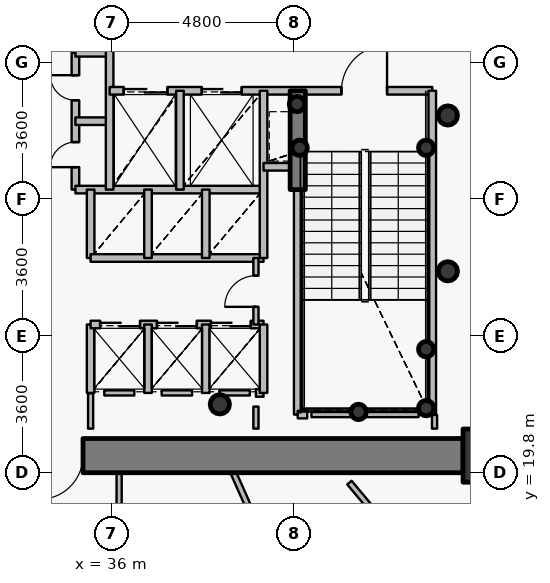
"""IFC4 building model, lengths in metres.
Left out: names, types, materials, properties, quantities, classifications, styles, units other than length and angle.
Written with IfcOpenShell. Run it as: python <this file> out.ifc"""

import sys

from ifc_helpers import new_model, si_unit, direction, frame, frame_2d, origin, origin_2d, place, context, subcontext, project, spatial, rectangle, hollow_circle, extrude, source, transform, mapped, element, fill, save


model = new_model("IFC4")
c1 = context("Model", 3, precision=1e-05, world=origin(), true_north=direction((0.0, 1.0)))
c2 = subcontext(c1, "Body", "Model", "MODEL_VIEW")
j1 = project(units=[si_unit("LENGTHUNIT", "METRE"), si_unit("PLANEANGLEUNIT", "RADIAN")], contexts=[c1])
p1 = place(None, origin())
s1 = spatial("IfcSite", under=j1, at=p1, CompositionType="ELEMENT")
p2 = place(p1, origin())
s2 = spatial("IfcBuilding", under=s1, at=p2, CompositionType="ELEMENT")
p3 = place(p2, frame((0.0, 0.0, 36.6)))
s3 = spatial("IfcBuildingStorey", under=s2, at=p3, CompositionType="ELEMENT", Elevation=36.6)
p4 = place(p3, frame((45.95, 20.25, 0.0), z_axis=(0.0, 0.0, 1.0), x_axis=(1.0, 0.0, 0.0)))
e1 = element("IfcColumn", 1, at=p4, inside=s3, PredefinedType="COLUMN", context=c2, shape_type="SweptSolid", body=[
    extrude(rectangle(XDim=1.4, YDim=1.4, at=origin_2d()), origin(), (0.0, 0.0, 1.0), 4.2),
])
p5 = place(p3, frame((38.85, 21.6, 0.0), z_axis=(0.0, 0.0, 1.0), x_axis=(1.0, 0.0, 0.0)))
e2 = element("IfcColumn", 2, at=p5, inside=s3, PredefinedType="COLUMN", context=c2, shape_type="SweptSolid", body=[
    extrude(hollow_circle(Radius=0.254, WallThickness=0.02, at=origin_2d()), origin(), (0.0, 0.0, 1.0), 4.2),
])
for number, where, z_axis, x_axis in (
    (3, (44.28, 21.5, 0.0), (0.0, 0.0, 1.0), (1.0, 0.0, 0.0)),
    (4, (44.28, 23.05, 0.0), (0.0, 0.0, 1.0), (1.0, 0.0, 0.0)),
    (5, (42.5, 21.4, 0.0), (0.0, 0.0, 1.0), (1.0, 0.0, 0.0)),
    (6, (40.95, 28.35, 0.0), (0.0, 0.0, 1.0), (1.0, 0.0, 0.0)),
    (7, (44.28, 28.35, 0.0), (0.0, 0.0, 1.0), (1.0, 0.0, 0.0)),
    (8, (40.88, 29.5, 0.0), (0.0, 0.0, 1.0), (1.0, 0.0, 0.0)),
):
    element("IfcColumn", number, at=place(p3, frame(where, z_axis=z_axis, x_axis=x_axis)), inside=s3, PredefinedType="COLUMN", context=c2, shape_type="SweptSolid", body=[
        extrude(hollow_circle(Radius=0.203, WallThickness=0.016, at=origin_2d()), origin(), (0.0, 0.0, 1.0), 4.2),
    ])
p6 = place(p3, frame((45.25, 20.25, 0.0), z_axis=(0.0, 0.0, 1.0), x_axis=(-1.0, 0.0, 0.0)))
e9 = element("IfcWall", 9, at=p6, inside=s3, PredefinedType="SHEAR", context=c2, shape_type="SweptSolid", body=[
    extrude(rectangle(XDim=18.5, YDim=0.9, at=frame_2d((9.25, 0.0))), origin(), (0.0, 0.0, 1.0), 3.4),
])
p7 = place(p6, frame((10.0, 0.0, 0.0)))
e10 = element("IfcOpeningElement", 10, at=p7, cuts=e9, PredefinedType="OPENING", context=c2, shape_type="SweptSolid", body=[
    extrude(rectangle(XDim=1.15, YDim=2.15, at=origin_2d()), frame((0.575, 0.46, 1.075), z_axis=(0.0, -1.0, 0.0), x_axis=(1.0, 0.0, 0.0)), (0.0, 0.0, 1.0), 0.92),
])
p8 = place(p3, frame((40.9, 27.25, 0.0), z_axis=(0.0, 0.0, 1.0), x_axis=(0.0, 1.0, 0.0)))
e11 = element("IfcWall", 11, at=p8, inside=s3, PredefinedType="SHEAR", context=c2, shape_type="SweptSolid", body=[
    extrude(rectangle(XDim=2.6, YDim=0.4, at=frame_2d((1.3, 0.0))), origin(), (0.0, 0.0, 1.0), 3.55),
])
for number, where, z_axis, x_axis in (
    (12, (44.85, 25.1, 0.0), (0.0, 0.0, 1.0), (1.0, 0.0, 0.0)),
    (13, (44.85, 29.2, 0.0), (0.0, 0.0, 1.0), (1.0, 0.0, 0.0)),
):
    element("IfcColumn", number, at=place(p3, frame(where, z_axis=z_axis, x_axis=x_axis)), inside=s3, PredefinedType="COLUMN", context=c2, shape_type="SweptSolid", body=[
        extrude(hollow_circle(Radius=0.254, WallThickness=0.02, at=origin_2d()), origin(), (0.0, 0.0, 1.0), 4.2),
    ])
p9 = place(p3, frame((35.05, 27.25, 0.0), z_axis=(0.0, 0.0, 1.0), x_axis=(0.0, 1.0, 0.0)))
e14 = element("IfcWall", 14, at=p9, inside=s3, PredefinedType="PARTITIONING", context=c2, shape_type="SweptSolid", body=[
    extrude(rectangle(XDim=3.6, YDim=0.2, at=frame_2d((1.8, 0.0))), origin(), (0.0, 0.0, 1.0), 3.95),
])
p10 = place(p9, frame((0.59, 0.0, 0.0)))
e15 = element("IfcOpeningElement", 15, at=p10, cuts=e14, PredefinedType="OPENING", context=c2, shape_type="SweptSolid", body=[
    extrude(rectangle(XDim=0.66, YDim=2.05, at=origin_2d()), frame((0.33, 0.11, 1.025), z_axis=(0.0, -1.0, 0.0), x_axis=(1.0, 0.0, 0.0)), (0.0, 0.0, 1.0), 0.22),
])
p11 = place(p9, frame((2.35, 0.0, 0.0)))
e16 = element("IfcOpeningElement", 16, at=p11, cuts=e14, PredefinedType="OPENING", context=c2, shape_type="SweptSolid", body=[
    extrude(rectangle(XDim=0.66, YDim=2.05, at=origin_2d()), frame((0.33, 0.11, 1.025), z_axis=(0.0, -1.0, 0.0), x_axis=(1.0, 0.0, 0.0)), (0.0, 0.0, 1.0), 0.22),
])
p12 = place(p3, frame((35.05, 27.25, 0.0), z_axis=(0.0, 0.0, 1.0), x_axis=(1.0, 0.0, 0.0)))
e17 = element("IfcWall", 17, at=p12, inside=s3, PredefinedType="PARTITIONING", context=c2, shape_type="SweptSolid", body=[
    extrude(rectangle(XDim=4.95, YDim=0.2, at=frame_2d((2.475, 0.0))), origin(), (0.0, 0.0, 1.0), 3.535),
])
for number, where, z_axis, x_axis in (
    (18, (35.05, 29.05, 0.0), (0.0, 0.0, 1.0), (1.0, 0.0, 0.0)),
    (19, (35.05, 30.85, 0.0), (0.0, 0.0, 1.0), (1.0, 0.0, 0.0)),
):
    element("IfcWall", number, at=place(p3, frame(where, z_axis=z_axis, x_axis=x_axis)), inside=s3, PredefinedType="PARTITIONING", context=c2, shape_type="SweptSolid", body=[
        extrude(rectangle(XDim=0.9, YDim=0.2, at=frame_2d((0.45, 0.0))), origin(), (0.0, 0.0, 1.0), 3.95),
    ])
p13 = place(p3, frame((35.45, 21.9, 0.0), z_axis=(0.0, 0.0, 1.0), x_axis=(0.0, 1.0, 0.0)))
e20 = element("IfcWall", 20, at=p13, inside=s3, PredefinedType="PARTITIONING", context=c2, shape_type="SweptSolid", body=[
    extrude(rectangle(XDim=1.8, YDim=0.2, at=frame_2d((0.9, 0.0))), origin(), (0.0, 0.0, 1.0), 3.95),
])
p14 = place(p3, frame((35.45, 23.7, 0.0), z_axis=(0.0, 0.0, 1.0), x_axis=(1.0, 0.0, 0.0)))
e21 = element("IfcWall", 21, at=p14, inside=s3, PredefinedType="PARTITIONING", context=c2, shape_type="SweptSolid", body=[
    extrude(rectangle(XDim=4.55, YDim=0.2, at=frame_2d((2.275, 0.0))), origin(), (0.0, 0.0, 1.0), 3.535),
])
p15 = place(p14, frame((0.25, 0.0, 0.0)))
e22 = element("IfcOpeningElement", 22, at=p15, cuts=e21, PredefinedType="OPENING", context=c2, shape_type="SweptSolid", body=[
    extrude(rectangle(XDim=1.05, YDim=2.15, at=origin_2d()), frame((0.525, 0.11, 1.075), z_axis=(0.0, -1.0, 0.0), x_axis=(1.0, 0.0, 0.0)), (0.0, 0.0, 1.0), 0.22),
])
p16 = place(p14, frame((1.745, 0.0, 0.0)))
e23 = element("IfcOpeningElement", 23, at=p16, cuts=e21, PredefinedType="OPENING", context=c2, shape_type="SweptSolid", body=[
    extrude(rectangle(XDim=1.05, YDim=2.15, at=origin_2d()), frame((0.525, 0.11, 1.075), z_axis=(0.0, -1.0, 0.0), x_axis=(1.0, 0.0, 0.0)), (0.0, 0.0, 1.0), 0.22),
])
p17 = place(p14, frame((3.165, 0.0, 0.0)))
e24 = element("IfcOpeningElement", 24, at=p17, cuts=e21, PredefinedType="OPENING", context=c2, shape_type="SweptSolid", body=[
    extrude(rectangle(XDim=1.05, YDim=2.15, at=origin_2d()), frame((0.525, 0.11, 1.075), z_axis=(0.0, -1.0, 0.0), x_axis=(1.0, 0.0, 0.0)), (0.0, 0.0, 1.0), 0.22),
])
p18 = place(p3, frame((35.45, 25.45, 0.0), z_axis=(0.0, 0.0, 1.0), x_axis=(0.0, 1.0, 0.0)))
e25 = element("IfcWall", 25, at=p18, inside=s3, PredefinedType="PARTITIONING", context=c2, shape_type="SweptSolid", body=[
    extrude(rectangle(XDim=1.8, YDim=0.2, at=frame_2d((0.9, 0.0))), origin(), (0.0, 0.0, 1.0), 3.95),
])
p19 = place(p3, frame((35.45, 25.45, 0.0), z_axis=(0.0, 0.0, 1.0), x_axis=(1.0, 0.0, 0.0)))
e26 = element("IfcWall", 26, at=p19, inside=s3, PredefinedType="PARTITIONING", context=c2, shape_type="SweptSolid", body=[
    extrude(rectangle(XDim=4.55, YDim=0.2, at=frame_2d((2.275, 0.0))), origin(), (0.0, 0.0, 1.0), 3.535),
])
p20 = place(p3, frame((35.95, 27.25, 0.0), z_axis=(0.0, 0.0, 1.0), x_axis=(0.0, 1.0, 0.0)))
e27 = element("IfcWall", 27, at=p20, inside=s3, PredefinedType="PARTITIONING", context=c2, shape_type="SweptSolid", body=[
    extrude(rectangle(XDim=3.8, YDim=0.2, at=frame_2d((1.9, 0.0))), origin(), (0.0, 0.0, 1.0), 3.95),
])
p21 = place(p3, frame((35.95, 29.85, 0.0), z_axis=(0.0, 0.0, 1.0), x_axis=(1.0, 0.0, 0.0)))
e28 = element("IfcWall", 28, at=p21, inside=s3, PredefinedType="PARTITIONING", context=c2, shape_type="SweptSolid", body=[
    extrude(rectangle(XDim=8.49, YDim=0.2, at=frame_2d((4.245, 0.0))), origin(), (0.0, 0.0, 1.0), 3.535),
])
p22 = place(p21, frame((6.1, 0.0, 0.0)))
e29 = element("IfcOpeningElement", 29, at=p22, cuts=e28, PredefinedType="OPENING", context=c2, shape_type="SweptSolid", body=[
    extrude(rectangle(XDim=1.2, YDim=2.15, at=origin_2d()), frame((0.6, 0.11, 1.075), z_axis=(0.0, -1.0, 0.0), x_axis=(1.0, 0.0, 0.0)), (0.0, 0.0, 1.0), 0.22),
])
p23 = place(p21, frame((0.37, 0.0, 0.0)))
e30 = element("IfcOpeningElement", 30, at=p23, cuts=e28, PredefinedType="OPENING", context=c2, shape_type="SweptSolid", body=[
    extrude(rectangle(XDim=1.15, YDim=2.15, at=origin_2d()), frame((0.575, 0.11, 1.075), z_axis=(0.0, -1.0, 0.0), x_axis=(1.0, 0.0, 0.0)), (0.0, 0.0, 1.0), 0.22),
])
p24 = place(p21, frame((2.425, 0.0, 0.0)))
e31 = element("IfcOpeningElement", 31, at=p24, cuts=e28, PredefinedType="OPENING", context=c2, shape_type="SweptSolid", body=[
    extrude(rectangle(XDim=1.05, YDim=2.15, at=origin_2d()), frame((0.525, 0.11, 1.075), z_axis=(0.0, -1.0, 0.0), x_axis=(1.0, 0.0, 0.0)), (0.0, 0.0, 1.0), 0.22),
])
p25 = place(p3, frame((36.2, 17.9, 0.0), z_axis=(0.0, 0.0, 1.0), x_axis=(0.0, 1.0, 0.0)))
e32 = element("IfcWall", 32, at=p25, inside=s3, PredefinedType="PARTITIONING", context=c2, shape_type="SweptSolid", body=[
    extrude(rectangle(XDim=1.9, YDim=0.135, at=frame_2d((0.95, 0.0))), origin(), (0.0, 0.0, 1.0), 3.285),
])
for number, where, z_axis, x_axis in (
    (33, (36.96, 21.9, 0.0), (0.0, 0.0, 1.0), (0.0, 1.0, 0.0)),
    (34, (36.96, 25.45, 0.0), (0.0, 0.0, 1.0), (0.0, 1.0, 0.0)),
):
    element("IfcWall", number, at=place(p3, frame(where, z_axis=z_axis, x_axis=x_axis)), inside=s3, PredefinedType="PARTITIONING", context=c2, shape_type="SweptSolid", body=[
        extrude(rectangle(XDim=1.8, YDim=0.2, at=frame_2d((0.9, 0.0))), origin(), (0.0, 0.0, 1.0), 3.95),
    ])
p26 = place(p3, frame((37.8, 27.25, 0.0), z_axis=(0.0, 0.0, 1.0), x_axis=(0.0, 1.0, 0.0)))
e35 = element("IfcWall", 35, at=p26, inside=s3, PredefinedType="PARTITIONING", context=c2, shape_type="SweptSolid", body=[
    extrude(rectangle(XDim=2.6, YDim=0.2, at=frame_2d((1.3, 0.0))), origin(), (0.0, 0.0, 1.0), 3.95),
])
for number, where, z_axis, x_axis in (
    (36, (38.48, 21.9, 0.0), (0.0, 0.0, 1.0), (0.0, 1.0, 0.0)),
    (37, (38.48, 25.45, 0.0), (0.0, 0.0, 1.0), (0.0, 1.0, 0.0)),
):
    element("IfcWall", number, at=place(p3, frame(where, z_axis=z_axis, x_axis=x_axis)), inside=s3, PredefinedType="PARTITIONING", context=c2, shape_type="SweptSolid", body=[
        extrude(rectangle(XDim=1.8, YDim=0.2, at=frame_2d((0.9, 0.0))), origin(), (0.0, 0.0, 1.0), 3.95),
    ])
p27 = place(p3, frame((39.206, 19.8, 0.0), z_axis=(0.0, 0.0, 1.0), x_axis=(0.406734516924, -0.913546404263, 0.0)))
e38 = element("IfcWall", 38, at=p27, inside=s3, PredefinedType="PARTITIONING", context=c2, shape_type="SweptSolid", body=[
    extrude(rectangle(XDim=17.213, YDim=0.15, at=frame_2d((8.606, 0.0))), origin(), (0.0, 0.0, 1.0), 3.285),
])
p28 = place(p27, frame((4.228, 0.0, 0.0)))
e39 = element("IfcOpeningElement", 39, at=p28, cuts=e38, PredefinedType="OPENING", context=c2, shape_type="SweptSolid", body=[
    extrude(rectangle(XDim=0.82, YDim=2.1, at=origin_2d()), frame((0.41, 0.085, 1.05), z_axis=(0.0, -1.0, 0.0), x_axis=(1.0, 0.0, 0.0)), (0.0, 0.0, 1.0), 0.17),
])
p29 = place(p27, frame((12.679, 0.0, 0.0)))
e40 = element("IfcOpeningElement", 40, at=p29, cuts=e38, PredefinedType="OPENING", context=c2, shape_type="SweptSolid", body=[
    extrude(rectangle(XDim=1.05, YDim=2.15, at=origin_2d()), frame((0.525, 0.085, 1.075), z_axis=(0.0, -1.0, 0.0), x_axis=(1.0, 0.0, 0.0)), (0.0, 0.0, 1.0), 0.17),
])
p30 = place(p3, frame((39.8, 21.9, 0.0), z_axis=(0.0, 0.0, 1.0), x_axis=(1.0, 0.0, 0.0)))
e41 = element("IfcWall", 41, at=p30, inside=s3, PredefinedType="PARTITIONING", context=c2, shape_type="SweptSolid", body=[
    extrude(rectangle(XDim=0.2, YDim=0.2, at=frame_2d((0.1, 0.0))), origin(), (0.0, 0.0, 1.0), 3.95),
])
p31 = place(p3, frame((39.8, 23.7, 0.0), z_axis=(0.0, 0.0, 1.0), x_axis=(0.0, 1.0, 0.0)))
e42 = element("IfcWall", 42, at=p31, inside=s3, PredefinedType="PARTITIONING", context=c2, shape_type="SweptSolid", body=[
    extrude(rectangle(XDim=1.75, YDim=0.135, at=frame_2d((0.875, 0.0))), origin(), (0.0, 0.0, 1.0), 3.95),
])
p32 = place(p31, frame((0.465, 0.0, 0.0)))
e43 = element("IfcOpeningElement", 43, at=p32, cuts=e42, PredefinedType="OPENING", context=c2, shape_type="SweptSolid", body=[
    extrude(rectangle(XDim=0.82, YDim=2.1, at=origin_2d()), frame((0.41, 0.078, 1.05), z_axis=(0.0, -1.0, 0.0), x_axis=(1.0, 0.0, 0.0)), (0.0, 0.0, 1.0), 0.155),
])
p33 = place(p3, frame((40.0, 21.9, 0.0), z_axis=(0.0, 0.0, 1.0), x_axis=(0.0, 1.0, 0.0)))
e44 = element("IfcWall", 44, at=p33, inside=s3, PredefinedType="PARTITIONING", context=c2, shape_type="SweptSolid", body=[
    extrude(rectangle(XDim=1.8, YDim=0.2, at=frame_2d((0.9, 0.0))), origin(), (0.0, 0.0, 1.0), 3.95),
])
p34 = place(p3, frame((40.0, 25.45, 0.0), z_axis=(0.0, 0.0, 1.0), x_axis=(0.0, 1.0, 0.0)))
e45 = element("IfcWall", 45, at=p34, inside=s3, PredefinedType="PARTITIONING", context=c2, shape_type="SweptSolid", body=[
    extrude(rectangle(XDim=4.4, YDim=0.2, at=frame_2d((2.2, 0.0))), origin(), (0.0, 0.0, 1.0), 3.95),
])
p35 = place(p3, frame((40.0, 27.85, 0.0), z_axis=(0.0, 0.0, 1.0), x_axis=(1.0, 0.0, 0.0)))
e46 = element("IfcWall", 46, at=p35, inside=s3, PredefinedType="PARTITIONING", context=c2, shape_type="SweptSolid", body=[
    extrude(rectangle(XDim=0.9, YDim=0.2, at=frame_2d((0.45, 0.0))), origin(), (0.0, 0.0, 1.0), 3.95),
])
p36 = place(p3, frame((40.9, 21.33, 0.0), z_axis=(0.0, 0.0, 1.0), x_axis=(0.0, 1.0, 0.0)))
e47 = element("IfcWall", 47, at=p36, inside=s3, PredefinedType="PARTITIONING", context=c2, shape_type="SweptSolid", body=[
    extrude(rectangle(XDim=5.91, YDim=0.2, at=frame_2d((2.955, 0.0))), origin(), (0.0, 0.0, 1.0), 3.485),
])
p37 = place(p3, frame((40.9, 21.33, 0.0), z_axis=(0.0, 0.0, 1.0), x_axis=(1.0, 0.0, 0.0)))
e48 = element("IfcWall", 48, at=p37, inside=s3, PredefinedType="PARTITIONING", context=c2, shape_type="SweptSolid", body=[
    extrude(rectangle(XDim=0.25, YDim=0.2, at=frame_2d((0.125, 0.0))), origin(), (0.0, 0.0, 1.0), 3.485),
])
p38 = place(p3, frame((44.44, 21.33, 0.0), z_axis=(0.0, 0.0, 1.0), x_axis=(0.0, 1.0, 0.0)))
e49 = element("IfcWall", 49, at=p38, inside=s3, PredefinedType="PARTITIONING", context=c2, shape_type="SweptSolid", body=[
    extrude(rectangle(XDim=8.52, YDim=0.2, at=frame_2d((4.26, 0.0))), origin(), (0.0, 0.0, 1.0), 3.95),
])
p39 = place(p3, frame((44.08, 21.33, 0.0), z_axis=(0.0, 0.0, 1.0), x_axis=(-1.0, 0.0, 0.0)))
e50 = element("IfcWall", 50, at=p39, inside=s3, PredefinedType="PARTITIONING", context=c2, shape_type="SweptSolid", body=[
    extrude(rectangle(XDim=2.82, YDim=0.135, at=frame_2d((1.41, 0.0))), origin(), (0.0, 0.0, 1.0), 3.485),
])
p40 = place(p3, frame((36.6, 21.9, 0.0), z_axis=(0.0, 0.0, 1.0), x_axis=(-1.0, 0.0, 0.0)))
e51 = element("IfcWall", 51, at=p40, inside=s3, PredefinedType="PARTITIONING", context=c2, shape_type="SweptSolid", body=[
    extrude(rectangle(XDim=0.79, YDim=0.135, at=frame_2d((0.395, 0.0))), origin(), (0.0, 0.0, 1.0), 3.95),
])
p41 = place(p3, frame((38.12, 21.9, 0.0), z_axis=(0.0, 0.0, 1.0), x_axis=(-1.0, 0.0, 0.0)))
e52 = element("IfcWall", 52, at=p41, inside=s3, PredefinedType="PARTITIONING", context=c2, shape_type="SweptSolid", body=[
    extrude(rectangle(XDim=0.8, YDim=0.135, at=frame_2d((0.4, 0.0))), origin(), (0.0, 0.0, 1.0), 3.95),
])
p42 = place(p3, frame((39.64, 21.9, 0.0), z_axis=(0.0, 0.0, 1.0), x_axis=(-1.0, 0.0, 0.0)))
e53 = element("IfcWall", 53, at=p42, inside=s3, PredefinedType="PARTITIONING", context=c2, shape_type="SweptSolid", body=[
    extrude(rectangle(XDim=0.8, YDim=0.135, at=frame_2d((0.4, 0.0))), origin(), (0.0, 0.0, 1.0), 3.535),
])
p43 = place(p3, frame((39.8, 20.96, 0.0), z_axis=(0.0, 0.0, 1.0), x_axis=(0.0, 1.0, 0.0)))
e54 = element("IfcWall", 54, at=p43, inside=s3, PredefinedType="PARTITIONING", context=c2, shape_type="SweptSolid", body=[
    extrude(rectangle(XDim=0.58, YDim=0.135, at=frame_2d((0.29, 0.0))), origin(), (0.0, 0.0, 1.0), 3.485),
])
p44 = place(p3, frame((44.5, 20.96, 0.0), z_axis=(0.0, 0.0, 1.0), x_axis=(0.0, 1.0, 0.0)))
e55 = element("IfcWall", 55, at=p44, inside=s3, PredefinedType="PARTITIONING", context=c2, shape_type="SweptSolid", body=[
    extrude(rectangle(XDim=0.36, YDim=0.135, at=frame_2d((0.18, 0.0))), origin(), (0.0, 0.0, 1.0), 3.95),
])
p45 = place(p3, frame((35.45, 21.89, 0.0), z_axis=(0.0, 0.0, 1.0), x_axis=(0.0, -1.0, 0.0)))
e56 = element("IfcWall", 56, at=p45, inside=s3, PredefinedType="PARTITIONING", context=c2, shape_type="SweptSolid", body=[
    extrude(rectangle(XDim=0.93, YDim=0.135, at=frame_2d((0.465, 0.0))), origin(), (0.0, 0.0, 1.0), 3.535),
])
p46 = place(p3, frame((42.26, 19.54, 0.0), z_axis=(0.0, 0.0, 1.0), x_axis=(0.642773520502, -0.766056265128, 0.0)))
e57 = element("IfcWall", 57, at=p46, inside=s3, PredefinedType="PARTITIONING", context=c2, shape_type="SweptSolid", body=[
    extrude(rectangle(XDim=5.418, YDim=0.15, at=frame_2d((2.709, 0.0))), origin(), (0.0, 0.0, 1.0), 3.95),
])
m1 = source(origin(), c2, "Body", "SweptSolid", [
    extrude(rectangle(XDim=1.15, YDim=2.15, at=origin_2d()), frame((0.575, 0.025, 1.075), z_axis=(0.0, -1.0, 0.0), x_axis=(1.0, 0.0, 0.0)), (0.0, 0.0, 1.0), 0.05),
])
p47 = place(p7, origin())
e58 = element("IfcDoor", 58, at=p47, inside=s3, OperationType="SINGLE_SWING_RIGHT", PredefinedType="DOOR", context=c2, shape_type="MappedRepresentation", body=[
    mapped(m1, transform((0.0, 0.0, 0.0), x_axis=(1.0, 0.0, 0.0), y_axis=(0.0, 1.0, 0.0), z_axis=(0.0, 0.0, 1.0), scale=1.0)),
])
fill(e10, e58)
m2 = source(origin(), c2, "Body", "SweptSolid", [
    extrude(rectangle(XDim=1.2, YDim=2.15, at=origin_2d()), frame((0.6, 0.025, 1.075), z_axis=(0.0, -1.0, 0.0), x_axis=(1.0, 0.0, 0.0)), (0.0, 0.0, 1.0), 0.05),
])
p48 = place(p22, origin())
e59 = element("IfcDoor", 59, at=p48, inside=s3, OperationType="SINGLE_SWING_RIGHT", PredefinedType="DOOR", context=c2, shape_type="MappedRepresentation", body=[
    mapped(m2, transform((0.0, 0.0, 0.0), x_axis=(1.0, 0.0, 0.0), y_axis=(0.0, 1.0, 0.0), z_axis=(0.0, 0.0, 1.0), scale=1.0)),
])
fill(e29, e59)
m3 = source(origin(), c2, "Body", "SweptSolid", [
    extrude(rectangle(XDim=1.15, YDim=2.15, at=origin_2d()), frame((0.575, 0.025, 1.075), z_axis=(0.0, -1.0, 0.0), x_axis=(1.0, 0.0, 0.0)), (0.0, 0.0, 1.0), 0.05),
])
p49 = place(p23, origin())
e60 = element("IfcDoor", 60, at=p49, inside=s3, OperationType="DOUBLE_DOOR_SLIDING", PredefinedType="USERDEFINED", context=c2, shape_type="MappedRepresentation", body=[
    mapped(m3, transform((0.0, 0.0, 0.0), x_axis=(1.0, 0.0, 0.0), y_axis=(0.0, 1.0, 0.0), z_axis=(0.0, 0.0, 1.0), scale=1.0)),
])
fill(e30, e60)
m4 = source(origin(), c2, "Body", "SweptSolid", [
    extrude(rectangle(XDim=1.05, YDim=2.15, at=origin_2d()), frame((0.525, 0.025, 1.075), z_axis=(0.0, -1.0, 0.0), x_axis=(1.0, 0.0, 0.0)), (0.0, 0.0, 1.0), 0.05),
])
p50 = place(p24, origin())
e61 = element("IfcDoor", 61, at=p50, inside=s3, OperationType="DOUBLE_DOOR_SLIDING", PredefinedType="USERDEFINED", context=c2, shape_type="MappedRepresentation", body=[
    mapped(m4, transform((0.0, 0.0, 0.0), x_axis=(1.0, 0.0, 0.0), y_axis=(0.0, 1.0, 0.0), z_axis=(0.0, 0.0, 1.0), scale=1.0)),
])
fill(e31, e61)
p51 = place(p15, origin())
e62 = element("IfcDoor", 62, at=p51, inside=s3, OperationType="DOUBLE_DOOR_SLIDING", PredefinedType="USERDEFINED", context=c2, shape_type="MappedRepresentation", body=[
    mapped(m4, transform((0.0, 0.0, 0.0), x_axis=(1.0, 0.0, 0.0), y_axis=(0.0, 1.0, 0.0), z_axis=(0.0, 0.0, 1.0), scale=1.0)),
])
fill(e22, e62)
p52 = place(p16, origin())
e63 = element("IfcDoor", 63, at=p52, inside=s3, OperationType="DOUBLE_DOOR_SLIDING", PredefinedType="USERDEFINED", context=c2, shape_type="MappedRepresentation", body=[
    mapped(m4, transform((0.0, 0.0, 0.0), x_axis=(1.0, 0.0, 0.0), y_axis=(0.0, 1.0, 0.0), z_axis=(0.0, 0.0, 1.0), scale=1.0)),
])
fill(e23, e63)
p53 = place(p17, origin())
e64 = element("IfcDoor", 64, at=p53, inside=s3, OperationType="DOUBLE_DOOR_SLIDING", PredefinedType="USERDEFINED", context=c2, shape_type="MappedRepresentation", body=[
    mapped(m4, transform((0.0, 0.0, 0.0), x_axis=(1.0, 0.0, 0.0), y_axis=(0.0, 1.0, 0.0), z_axis=(0.0, 0.0, 1.0), scale=1.0)),
])
fill(e24, e64)
m5 = source(origin(), c2, "Body", "SweptSolid", [
    extrude(rectangle(XDim=0.66, YDim=2.05, at=origin_2d()), frame((0.33, 0.025, 1.025), z_axis=(0.0, -1.0, 0.0), x_axis=(1.0, 0.0, 0.0)), (0.0, 0.0, 1.0), 0.05),
])
p54 = place(p10, origin())
e65 = element("IfcDoor", 65, at=p54, inside=s3, OperationType="SINGLE_SWING_LEFT", PredefinedType="USERDEFINED", context=c2, shape_type="MappedRepresentation", body=[
    mapped(m5, transform((0.0, 0.0, 0.0), x_axis=(1.0, 0.0, 0.0), y_axis=(0.0, 1.0, 0.0), z_axis=(0.0, 0.0, 1.0), scale=1.0)),
])
fill(e15, e65)
p55 = place(p11, origin())
e66 = element("IfcDoor", 66, at=p55, inside=s3, OperationType="SINGLE_SWING_RIGHT", PredefinedType="USERDEFINED", context=c2, shape_type="MappedRepresentation", body=[
    mapped(m5, transform((0.0, 0.0, 0.0), x_axis=(1.0, 0.0, 0.0), y_axis=(0.0, 1.0, 0.0), z_axis=(0.0, 0.0, 1.0), scale=1.0)),
])
fill(e16, e66)
m6 = source(origin(), c2, "Body", "SweptSolid", [
    extrude(rectangle(XDim=0.82, YDim=2.1, at=origin_2d()), frame((0.41, 0.025, 1.05), z_axis=(0.0, -1.0, 0.0), x_axis=(1.0, 0.0, 0.0)), (0.0, 0.0, 1.0), 0.05),
])
p56 = place(p32, origin())
e67 = element("IfcDoor", 67, at=p56, inside=s3, OperationType="SINGLE_SWING_LEFT", PredefinedType="DOOR", context=c2, shape_type="MappedRepresentation", body=[
    mapped(m6, transform((0.0, 0.0, 0.0), x_axis=(1.0, 0.0, 0.0), y_axis=(0.0, 1.0, 0.0), z_axis=(0.0, 0.0, 1.0), scale=1.0)),
])
fill(e43, e67)
save(model, sys.argv[1])
